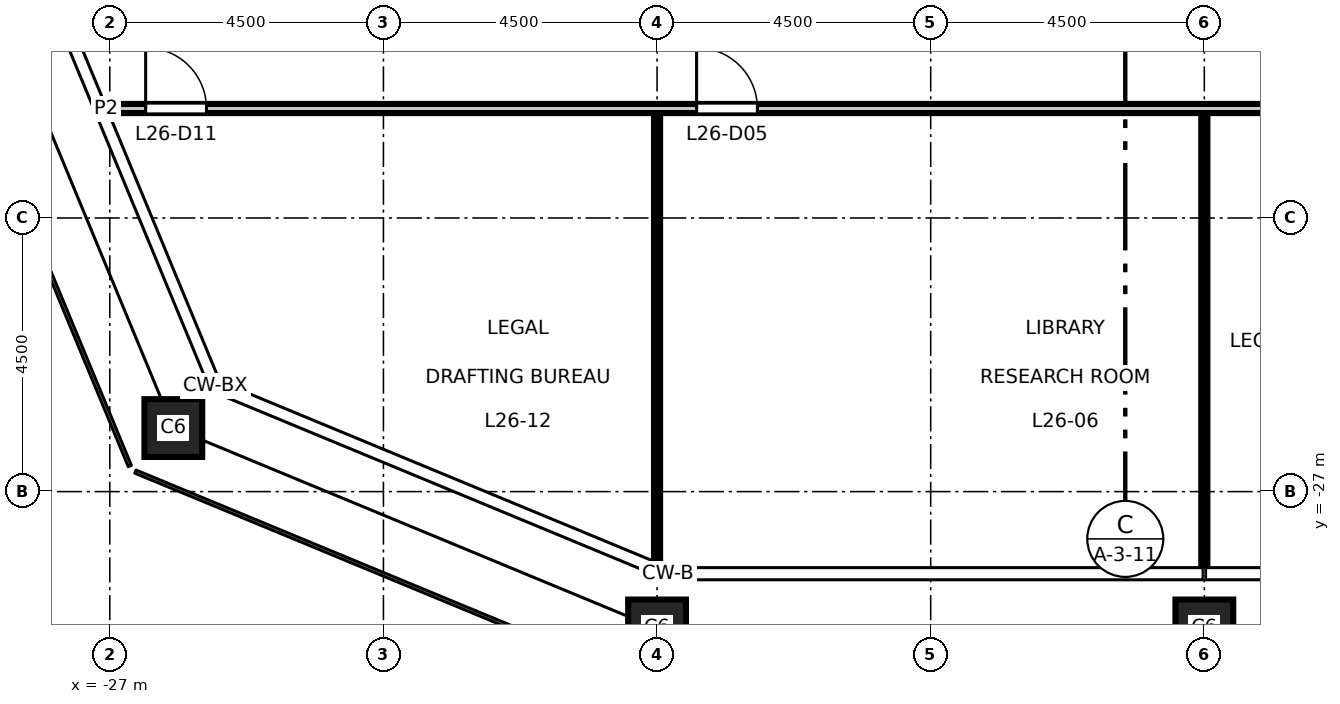
"""IFC4 building model, lengths in metres.
Left out: names, types, materials, properties, quantities, classifications, styles, units other than length and angle.
Written with IfcOpenShell. Run it as: python <this file> out.ifc"""

import sys

from ifc_helpers import new_model, si_unit, direction, frame, frame_2d, origin, origin_2d, place, context, subcontext, project, spatial, rectangle, hollow_rectangle, extrude, element, fill, save


model = new_model("IFC4")
c1 = context("Model", 3, precision=1e-05, world=origin(), true_north=direction((0.0, 1.0)))
c2 = subcontext(c1, "Body", "Model", "MODEL_VIEW")
j1 = project(units=[si_unit("LENGTHUNIT", "METRE"), si_unit("PLANEANGLEUNIT", "RADIAN")], contexts=[c1])
p1 = place(None, origin())
s1 = spatial("IfcSite", under=j1, at=p1, CompositionType="ELEMENT")
p2 = place(p1, origin())
s2 = spatial("IfcBuilding", under=s1, at=p2, CompositionType="ELEMENT")
p3 = place(p2, frame((0.0, 0.0, 122.7)))
s3 = spatial("IfcBuildingStorey", under=s2, at=p3, CompositionType="ELEMENT", Elevation=122.7)
for number, where, z_axis, x_axis in (
    (1, (-18.0, -29.25, 0.0), (0.0, 0.0, 1.0), (1.0, 0.0, 0.0)),
    (2, (-9.0, -29.25, 0.0), (0.0, 0.0, 1.0), (1.0, 0.0, 0.0)),
    (3, (-25.955, -25.955, 0.0), (0.0, 0.0, 1.0), (1.0, 0.0, 0.0)),
):
    element("IfcColumn", number, at=place(p3, frame(where, z_axis=z_axis, x_axis=x_axis)), inside=s3, PredefinedType="COLUMN", context=c2, shape_type="SweptSolid", body=[
        extrude(hollow_rectangle(XDim=0.95, YDim=0.95, WallThickness=0.055, at=origin_2d()), origin(), (0.0, 0.0, 1.0), 4.5),
    ])
p4 = place(p3, frame((-27.06, -20.7, 0.0), z_axis=(0.0, 0.0, 1.0), x_axis=(1.0, 0.0, 0.0)))
e4 = element("IfcWall", 4, at=p4, inside=s3, PredefinedType="PARTITIONING", context=c2, shape_type="SweptSolid", body=[
    extrude(rectangle(XDim=54.12, YDim=0.15, at=frame_2d((27.06, 0.0))), origin(), (0.0, 0.0, 1.0), 4.35),
])
p5 = place(p4, frame((9.71, 0.0, 0.0)))
e5 = element("IfcOpeningElement", 5, at=p5, cuts=e4, PredefinedType="OPENING", context=c2, shape_type="SweptSolid", body=[
    extrude(rectangle(XDim=1.0, YDim=2.1, at=frame_2d((0.5, 1.05))), frame((0.0, 0.085, 0.0), z_axis=(0.0, -1.0, 0.0), x_axis=(1.0, 0.0, 0.0)), (0.0, 0.0, 1.0), 0.17),
])
p6 = place(p4, frame((25.46, 0.0, 0.0)))
e6 = element("IfcOpeningElement", 6, at=p6, cuts=e4, PredefinedType="OPENING", context=c2, shape_type="SweptSolid", body=[
    extrude(rectangle(XDim=1.0, YDim=2.1, at=frame_2d((0.5, 1.05))), frame((0.0, 0.085, 0.0), z_axis=(0.0, -1.0, 0.0), x_axis=(1.0, 0.0, 0.0)), (0.0, 0.0, 1.0), 0.17),
])
p7 = place(p4, frame((27.71, 0.0, 0.0)))
e7 = element("IfcOpeningElement", 7, at=p7, cuts=e4, PredefinedType="OPENING", context=c2, shape_type="SweptSolid", body=[
    extrude(rectangle(XDim=1.0, YDim=2.1, at=frame_2d((0.5, 1.05))), frame((0.0, 0.085, 0.0), z_axis=(0.0, -1.0, 0.0), x_axis=(1.0, 0.0, 0.0)), (0.0, 0.0, 1.0), 0.17),
])
p8 = place(p4, frame((43.46, 0.0, 0.0)))
e8 = element("IfcOpeningElement", 8, at=p8, cuts=e4, PredefinedType="OPENING", context=c2, shape_type="SweptSolid", body=[
    extrude(rectangle(XDim=1.0, YDim=2.1, at=frame_2d((0.5, 1.05))), frame((0.0, 0.085, 0.0), z_axis=(0.0, -1.0, 0.0), x_axis=(1.0, 0.0, 0.0)), (0.0, 0.0, 1.0), 0.17),
])
p9 = place(p4, frame((0.65, 0.0, 0.0)))
e9 = element("IfcOpeningElement", 9, at=p9, cuts=e4, PredefinedType="OPENING", context=c2, shape_type="SweptSolid", body=[
    extrude(rectangle(XDim=1.0, YDim=2.1, at=frame_2d((0.5, 1.05))), frame((0.0, 0.085, 0.0), z_axis=(0.0, -1.0, 0.0), x_axis=(1.0, 0.0, 0.0)), (0.0, 0.0, 1.0), 0.17),
])
p10 = place(p4, frame((52.46, 0.0, 0.0)))
e10 = element("IfcOpeningElement", 10, at=p10, cuts=e4, PredefinedType="OPENING", context=c2, shape_type="SweptSolid", body=[
    extrude(rectangle(XDim=1.0, YDim=2.1, at=frame_2d((0.5, 1.05))), frame((0.0, 0.085, 0.0), z_axis=(0.0, -1.0, 0.0), x_axis=(1.0, 0.0, 0.0)), (0.0, 0.0, 1.0), 0.17),
])
p11 = place(p3, frame((-18.0, -28.178, 0.0), z_axis=(0.0, 0.0, 1.0), x_axis=(0.0, 1.0, 0.0)))
e11 = element("IfcWall", 11, at=p11, inside=s3, PredefinedType="PARTITIONING", context=c2, shape_type="SweptSolid", body=[
    extrude(rectangle(XDim=7.403, YDim=0.1, at=frame_2d((3.702, 0.0))), origin(), (0.0, 0.0, 1.0), 3.45),
])
p12 = place(p3, frame((-9.0, -28.26, 0.0), z_axis=(0.0, 0.0, 1.0), x_axis=(0.0, 1.0, 0.0)))
e12 = element("IfcWall", 12, at=p12, inside=s3, PredefinedType="PARTITIONING", context=c2, shape_type="SweptSolid", body=[
    extrude(rectangle(XDim=7.485, YDim=0.1, at=frame_2d((3.743, 0.0))), origin(), (0.0, 0.0, 1.0), 3.45),
])
p13 = place(p5, origin())
e13 = element("IfcDoor", 13, at=p13, inside=s3, OperationType="SINGLE_SWING_LEFT", PredefinedType="DOOR", context=c2, shape_type="SweptSolid", body=[
    extrude(rectangle(XDim=1.0, YDim=2.1, at=frame_2d((0.5, 1.05))), frame((0.0, 0.025, 0.0), z_axis=(0.0, -1.0, 0.0), x_axis=(1.0, 0.0, 0.0)), (0.0, 0.0, 1.0), 0.05),
])
fill(e5, e13)
p14 = place(p9, origin())
e14 = element("IfcDoor", 14, at=p14, inside=s3, OperationType="SINGLE_SWING_LEFT", PredefinedType="DOOR", context=c2, shape_type="SweptSolid", body=[
    extrude(rectangle(XDim=1.0, YDim=2.1, at=frame_2d((0.5, 1.05))), frame((0.0, 0.025, 0.0), z_axis=(0.0, -1.0, 0.0), x_axis=(1.0, 0.0, 0.0)), (0.0, 0.0, 1.0), 0.05),
])
fill(e9, e14)
save(model, sys.argv[1])
